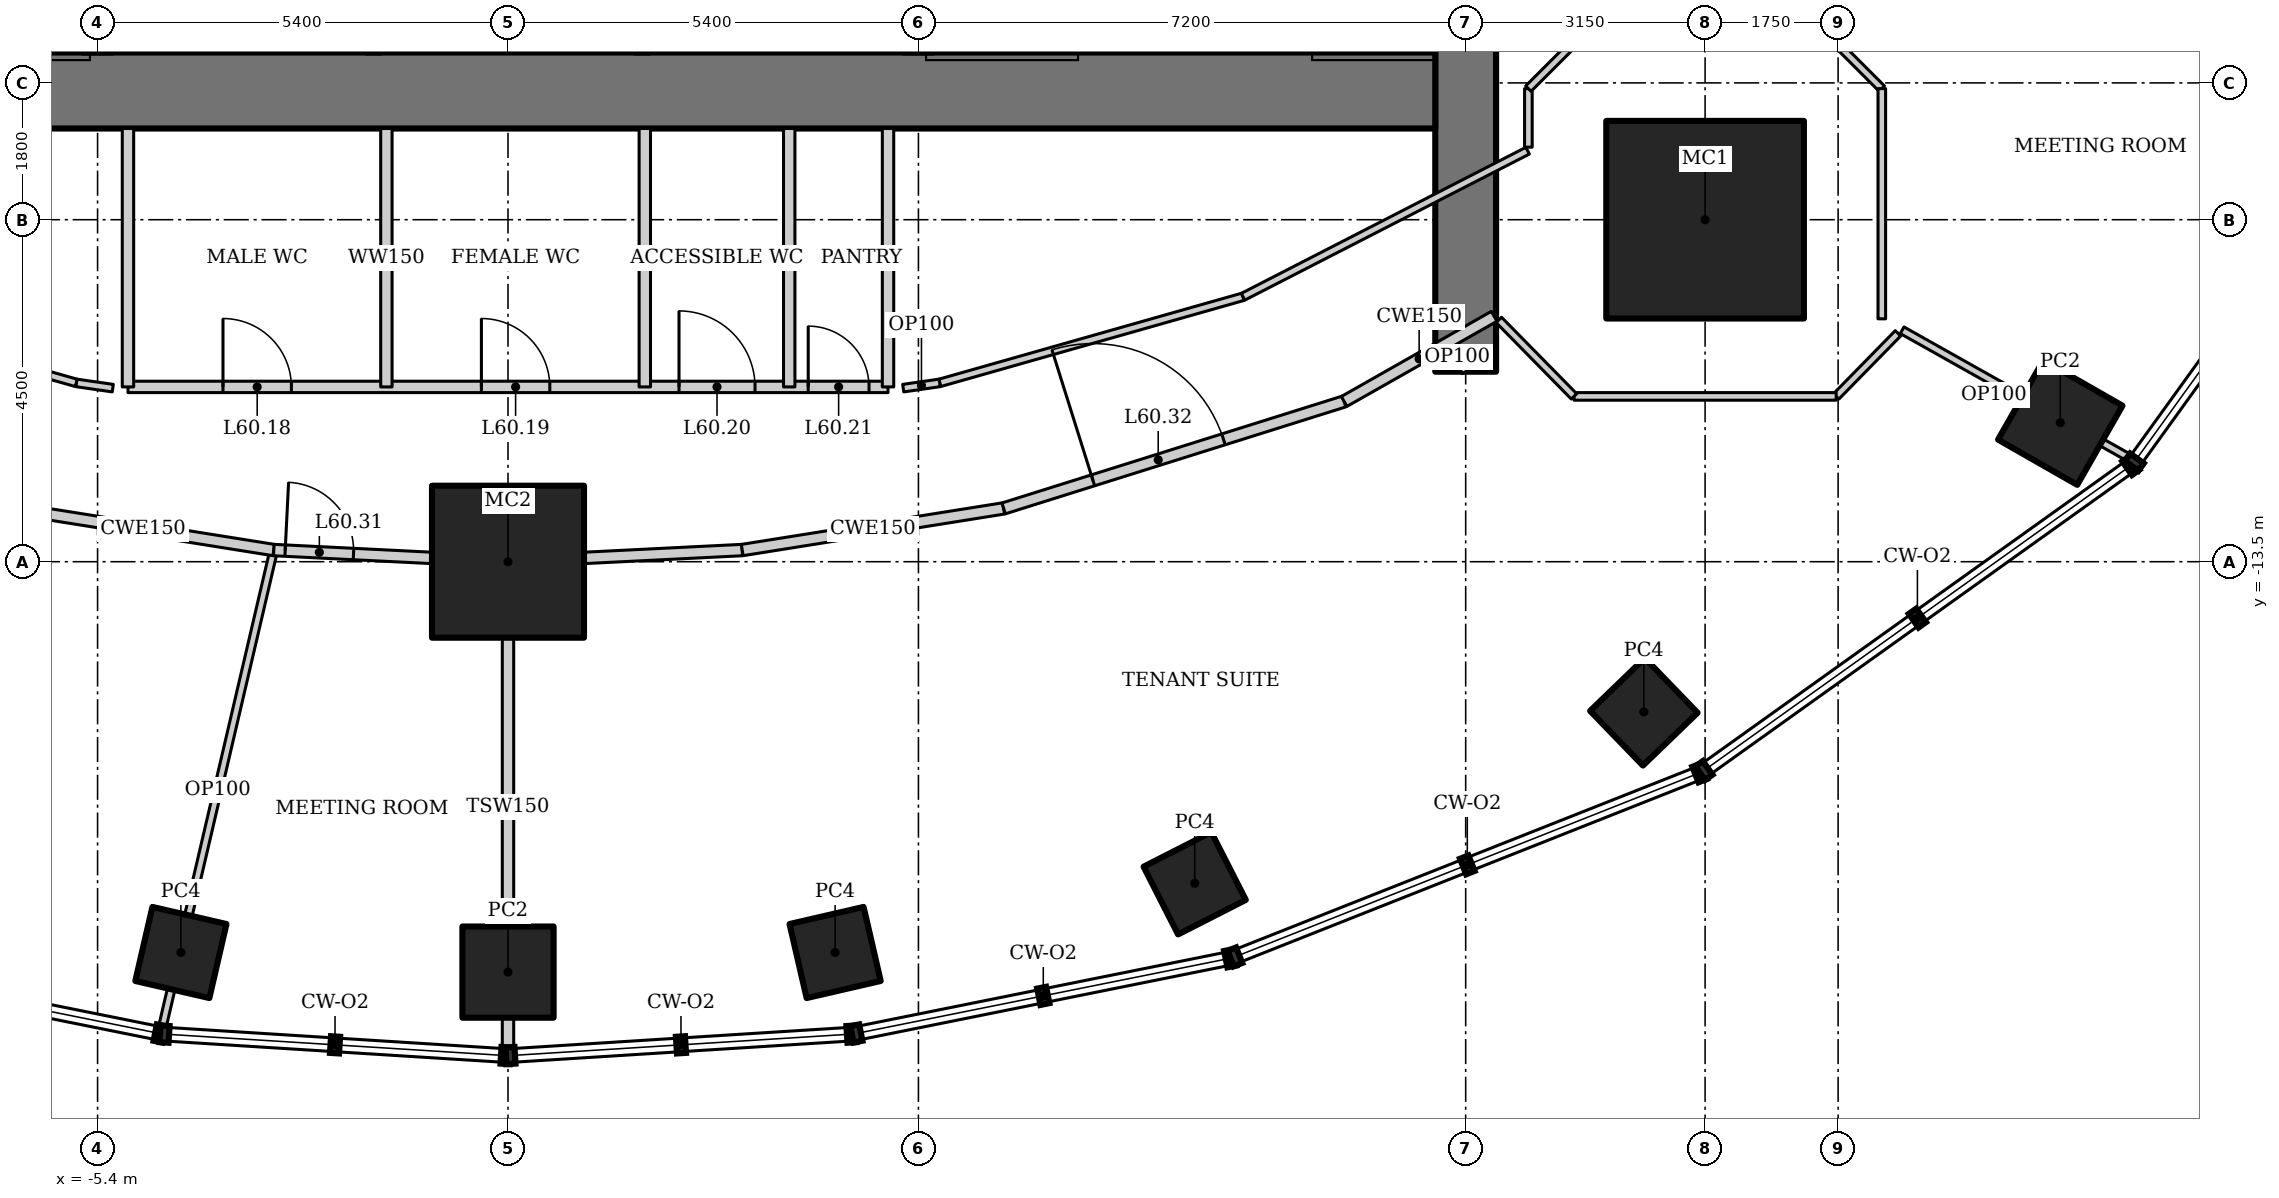
"""IFC4 building model, lengths in metres.
Left out: names, types, materials, properties, quantities, classifications, styles, units other than length and angle.
Written with IfcOpenShell. Run it as: python <this file> out.ifc"""

import sys

from ifc_helpers import new_model, si_unit, direction, frame, frame_2d, origin, origin_2d, place, context, subcontext, project, spatial, rectangle, hollow_rectangle, extrude, element, fill, save


model = new_model("IFC4")
c1 = context("Model", 3, precision=1e-05, world=origin(), true_north=direction((0.0, 1.0)))
c2 = subcontext(c1, "Body", "Model", "MODEL_VIEW")
j1 = project(units=[si_unit("LENGTHUNIT", "METRE"), si_unit("PLANEANGLEUNIT", "RADIAN")], contexts=[c1])
p1 = place(None, origin())
s1 = spatial("IfcSite", under=j1, at=p1, CompositionType="ELEMENT")
p2 = place(p1, origin())
s2 = spatial("IfcBuilding", under=s1, at=p2, CompositionType="ELEMENT")
p3 = place(p2, frame((0.0, 0.0, 257.8)))
s3 = spatial("IfcBuildingStorey", under=s2, at=p3, CompositionType="ELEMENT", Elevation=257.8)
p4 = place(p3, frame((0.0, -13.5, 0.0), z_axis=(0.0, 0.0, 1.0), x_axis=(1.0, 0.0, 0.0)))
e1 = element("IfcColumn", 1, at=p4, inside=s3, PredefinedType="COLUMN", context=c2, shape_type="SweptSolid", body=[
    extrude(hollow_rectangle(XDim=2.0, YDim=2.0, WallThickness=0.17, at=origin_2d()), origin(), (0.0, 0.0, 1.0), 4.2),
])
p5 = place(p3, frame((15.75, -9.0, 0.0), z_axis=(0.0, 0.0, 1.0), x_axis=(1.0, 0.0, 0.0)))
e2 = element("IfcColumn", 2, at=p5, inside=s3, PredefinedType="COLUMN", context=c2, shape_type="SweptSolid", body=[
    extrude(hollow_rectangle(XDim=2.6, YDim=2.6, WallThickness=0.13, at=origin_2d()), origin(), (0.0, 0.0, 1.0), 4.2),
])
p6 = place(p3, frame((-4.304, -18.642, 0.0), z_axis=(0.0, 0.0, 1.0), x_axis=(0.224951054344, 0.974370064785, 0.0)))
e3 = element("IfcColumn", 3, at=p6, inside=s3, PredefinedType="COLUMN", context=c2, shape_type="SweptSolid", body=[
    extrude(hollow_rectangle(XDim=1.0, YDim=1.0, WallThickness=0.08, at=origin_2d()), origin(), (0.0, 0.0, 1.0), 4.2),
])
p7 = place(p3, frame((0.0, -18.9, 0.0), z_axis=(0.0, 0.0, 1.0), x_axis=(1.0, 0.0, 0.0)))
e4 = element("IfcColumn", 4, at=p7, inside=s3, PredefinedType="COLUMN", context=c2, shape_type="SweptSolid", body=[
    extrude(hollow_rectangle(XDim=1.2, YDim=1.2, WallThickness=0.1, at=origin_2d()), origin(), (0.0, 0.0, 1.0), 4.2),
])
for number, where, z_axis, x_axis in (
    (5, (4.304, -18.642, 0.0), (0.0, 0.0, 1.0), (0.974, 0.225, 0.0)),
    (6, (9.035, -17.731, 0.0), (0.0, 0.0, 1.0), (0.891, 0.454, 0.0)),
    (7, (14.944, -15.475, 0.0), (0.0, 0.0, 1.0), (0.719, 0.695, 0.0)),
):
    element("IfcColumn", number, at=place(p3, frame(where, z_axis=z_axis, x_axis=x_axis)), inside=s3, PredefinedType="COLUMN", context=c2, shape_type="SweptSolid", body=[
        extrude(hollow_rectangle(XDim=1.0, YDim=1.0, WallThickness=0.08, at=origin_2d()), origin(), (0.0, 0.0, 1.0), 4.2),
    ])
p8 = place(p3, frame((20.423, -11.67, 0.0), z_axis=(0.0, 0.0, 1.0), x_axis=(0.496139221777, 0.86824298017, 0.0)))
e8 = element("IfcColumn", 8, at=p8, inside=s3, PredefinedType="COLUMN", context=c2, shape_type="SweptSolid", body=[
    extrude(hollow_rectangle(XDim=1.2, YDim=1.2, WallThickness=0.1, at=origin_2d()), origin(), (0.0, 0.0, 1.0), 4.2),
])
p9 = place(p3, frame((12.6, -11.0, 0.0), z_axis=(0.0, 0.0, 1.0), x_axis=(0.0, 1.0, 0.0)))
e9 = element("IfcWall", 9, at=p9, inside=s3, PredefinedType="SHEAR", context=c2, shape_type="SweptSolid", body=[
    extrude(rectangle(XDim=22.0, YDim=0.8, at=frame_2d((11.0, 0.0))), origin(), (0.0, 0.0, 1.0), 4.2),
])
p10 = place(p9, frame((10.1, 0.0, 0.0)))
e10 = element("IfcOpeningElement", 10, at=p10, cuts=e9, PredefinedType="OPENING", context=c2, shape_type="SweptSolid", body=[
    extrude(rectangle(XDim=1.8, YDim=2.1, at=frame_2d((0.9, 1.05))), frame((0.0, 0.41, 0.0), z_axis=(0.0, -1.0, 0.0), x_axis=(1.0, 0.0, 0.0)), (0.0, 0.0, 1.0), 0.82),
])
p11 = place(p3, frame((-12.2, -7.3, 0.0), z_axis=(0.0, 0.0, 1.0), x_axis=(1.0, 0.0, 0.0)))
e11 = element("IfcWall", 11, at=p11, inside=s3, PredefinedType="SHEAR", context=c2, shape_type="SweptSolid", body=[
    extrude(rectangle(XDim=24.4, YDim=1.0, at=frame_2d((12.2, 0.0))), origin(), (0.0, 0.0, 1.0), 4.2),
])
for number, where, z_axis, x_axis in (
    (12, (-1.767, -2.6, 0.0), (0.0, 0.0, 1.0), (0.0, -1.0, 0.0)),
    (13, (1.767, -2.6, 0.0), (0.0, 0.0, 1.0), (0.0, -1.0, 0.0)),
):
    element("IfcWall", number, at=place(p3, frame(where, z_axis=z_axis, x_axis=x_axis)), inside=s3, PredefinedType="SOLIDWALL", context=c2, shape_type="SweptSolid", body=[
        extrude(rectangle(XDim=4.2, YDim=0.2, at=frame_2d((2.1, 0.0))), origin(), (0.0, 0.0, 1.0), 4.2),
    ])
p12 = place(p3, frame((-4.556, -19.657, 0.0), z_axis=(0.0, 0.0, 1.0), x_axis=(0.227524978141, 0.973772244584, 0.0)))
e14 = element("IfcWall", 14, at=p12, inside=s3, PredefinedType="PARTITIONING", context=c2, shape_type="SweptSolid", body=[
    extrude(rectangle(XDim=6.48, YDim=0.1, at=frame_2d((3.24, 0.0))), origin(), (0.0, 0.0, 1.0), 3.293),
])
p13 = place(p3, frame((0.0, -19.945, 0.0), z_axis=(0.0, 0.0, 1.0), x_axis=(0.0, 1.0, 0.0)))
e15 = element("IfcWall", 15, at=p13, inside=s3, PredefinedType="PARTITIONING", context=c2, shape_type="SweptSolid", body=[
    extrude(rectangle(XDim=6.445, YDim=0.15, at=frame_2d((3.222, 0.0))), origin(), (0.0, 0.0, 1.0), 3.646),
])
p14 = place(p3, frame((-6.521, -12.799, 0.0), z_axis=(0.0, 0.0, 1.0), x_axis=(0.987554093087, -0.157279729233, 0.0)))
e16 = element("IfcWall", 16, at=p14, inside=s3, PredefinedType="PARTITIONING", context=c2, shape_type="SweptSolid", body=[
    extrude(rectangle(XDim=3.483, YDim=0.15, at=frame_2d((1.742, 0.0))), origin(), (0.0, 0.0, 1.0), 4.05),
])
p15 = place(p3, frame((-3.081, -13.347, 0.0), z_axis=(0.0, 0.0, 1.0), x_axis=(0.99876434787, -0.049696855278, 0.0)))
e17 = element("IfcWall", 17, at=p15, inside=s3, PredefinedType="PARTITIONING", context=c2, shape_type="SweptSolid", body=[
    extrude(rectangle(XDim=3.085, YDim=0.15, at=frame_2d((1.542, 0.0))), origin(), (0.0, 0.0, 1.0), 4.05),
])
p16 = place(p15, frame((0.15, 0.0, 0.0)))
e18 = element("IfcOpeningElement", 18, at=p16, cuts=e17, PredefinedType="OPENING", context=c2, shape_type="SweptSolid", body=[
    extrude(rectangle(XDim=0.9, YDim=2.1, at=frame_2d((0.45, 1.05))), frame((0.0, 0.085, 0.0), z_axis=(0.0, -1.0, 0.0), x_axis=(1.0, 0.0, 0.0)), (0.0, 0.0, 1.0), 0.17),
])
p17 = place(p3, frame((0.0, -13.5, 0.0), z_axis=(0.0, 0.0, 1.0), x_axis=(0.99876434787, 0.049696855278, 0.0)))
e19 = element("IfcWall", 19, at=p17, inside=s3, PredefinedType="PARTITIONING", context=c2, shape_type="SweptSolid", body=[
    extrude(rectangle(XDim=3.085, YDim=0.15, at=frame_2d((1.542, 0.0))), origin(), (0.0, 0.0, 1.0), 4.05),
])
p18 = place(p3, frame((3.081, -13.347, 0.0), z_axis=(0.0, 0.0, 1.0), x_axis=(0.987554093087, 0.157279729233, 0.0)))
e20 = element("IfcWall", 20, at=p18, inside=s3, PredefinedType="PARTITIONING", context=c2, shape_type="SweptSolid", body=[
    extrude(rectangle(XDim=3.483, YDim=0.15, at=frame_2d((1.742, 0.0))), origin(), (0.0, 0.0, 1.0), 4.05),
])
p19 = place(p3, frame((6.521, -12.799, 0.0), z_axis=(0.0, 0.0, 1.0), x_axis=(0.954031103669, 0.299707612903, 0.0)))
e21 = element("IfcWall", 21, at=p19, inside=s3, PredefinedType="PARTITIONING", context=c2, shape_type="SweptSolid", body=[
    extrude(rectangle(XDim=4.695, YDim=0.15, at=frame_2d((2.348, 0.0))), origin(), (0.0, 0.0, 1.0), 4.05),
])
p20 = place(p19, frame((1.231, 0.0, 0.0)))
e22 = element("IfcOpeningElement", 22, at=p20, cuts=e21, PredefinedType="OPENING", context=c2, shape_type="SweptSolid", body=[
    extrude(rectangle(XDim=1.8, YDim=2.1, at=frame_2d((0.9, 1.05))), frame((0.0, 0.085, 0.0), z_axis=(0.0, -1.0, 0.0), x_axis=(1.0, 0.0, 0.0)), (0.0, 0.0, 1.0), 0.17),
])
p21 = place(p3, frame((-5.0, -11.2, 0.0), z_axis=(0.0, 0.0, 1.0), x_axis=(1.0, 0.0, 0.0)))
e23 = element("IfcWall", 23, at=p21, inside=s3, PredefinedType="SOLIDWALL", context=c2, shape_type="SweptSolid", body=[
    extrude(rectangle(XDim=10.0, YDim=0.15, at=frame_2d((5.0, 0.0))), origin(), (0.0, 0.0, 1.0), 4.05),
])
p22 = place(p21, frame((1.25, 0.0, 0.0)))
e24 = element("IfcOpeningElement", 24, at=p22, cuts=e23, PredefinedType="OPENING", context=c2, shape_type="SweptSolid", body=[
    extrude(rectangle(XDim=0.9, YDim=2.1, at=frame_2d((0.45, 1.05))), frame((0.0, 0.085, 0.0), z_axis=(0.0, -1.0, 0.0), x_axis=(1.0, 0.0, 0.0)), (0.0, 0.0, 1.0), 0.17),
])
p23 = place(p21, frame((4.65, 0.0, 0.0)))
e25 = element("IfcOpeningElement", 25, at=p23, cuts=e23, PredefinedType="OPENING", context=c2, shape_type="SweptSolid", body=[
    extrude(rectangle(XDim=0.9, YDim=2.1, at=frame_2d((0.45, 1.05))), frame((0.0, 0.085, 0.0), z_axis=(0.0, -1.0, 0.0), x_axis=(1.0, 0.0, 0.0)), (0.0, 0.0, 1.0), 0.17),
])
p24 = place(p21, frame((7.25, 0.0, 0.0)))
e26 = element("IfcOpeningElement", 26, at=p24, cuts=e23, PredefinedType="OPENING", context=c2, shape_type="SweptSolid", body=[
    extrude(rectangle(XDim=1.0, YDim=2.1, at=frame_2d((0.5, 1.05))), frame((0.0, 0.085, 0.0), z_axis=(0.0, -1.0, 0.0), x_axis=(1.0, 0.0, 0.0)), (0.0, 0.0, 1.0), 0.17),
])
p25 = place(p21, frame((8.95, 0.0, 0.0)))
e27 = element("IfcOpeningElement", 27, at=p25, cuts=e23, PredefinedType="OPENING", context=c2, shape_type="SweptSolid", body=[
    extrude(rectangle(XDim=0.8, YDim=2.1, at=frame_2d((0.4, 1.05))), frame((0.0, 0.085, 0.0), z_axis=(0.0, -1.0, 0.0), x_axis=(1.0, 0.0, 0.0)), (0.0, 0.0, 1.0), 0.17),
])
for number, where, z_axis, x_axis in (
    (28, (-5.0, -7.8, 0.0), (0.0, 0.0, 1.0), (0.0, -1.0, 0.0)),
    (29, (5.0, -7.8, 0.0), (0.0, 0.0, 1.0), (0.0, -1.0, 0.0)),
    (30, (-1.6, -7.8, 0.0), (0.0, 0.0, 1.0), (0.0, -1.0, 0.0)),
):
    element("IfcWall", number, at=place(p3, frame(where, z_axis=z_axis, x_axis=x_axis)), inside=s3, PredefinedType="SOLIDWALL", context=c2, shape_type="SweptSolid", body=[
        extrude(rectangle(XDim=3.4, YDim=0.15, at=frame_2d((1.7, 0.0))), origin(), (0.0, 0.0, 1.0), 4.05),
    ])
p26 = place(p3, frame((1.8, -7.8, 0.0), z_axis=(0.0, 0.0, 1.0), x_axis=(0.0, -1.0, 0.0)))
e31 = element("IfcWall", 31, at=p26, inside=s3, PredefinedType="SOLIDWALL", context=c2, shape_type="SweptSolid", body=[
    extrude(rectangle(XDim=3.4, YDim=0.15, at=frame_2d((1.7, 0.0))), origin(), (0.0, 0.0, 1.0), 3.293),
])
p27 = place(p3, frame((3.7, -7.8, 0.0), z_axis=(0.0, 0.0, 1.0), x_axis=(0.0, -1.0, 0.0)))
e32 = element("IfcWall", 32, at=p27, inside=s3, PredefinedType="SOLIDWALL", context=c2, shape_type="SweptSolid", body=[
    extrude(rectangle(XDim=3.4, YDim=0.15, at=frame_2d((1.7, 0.0))), origin(), (0.0, 0.0, 1.0), 4.05),
])
p28 = place(p3, frame((-5.2, -11.216, 0.0), z_axis=(0.0, 0.0, 1.0), x_axis=(-0.989797891768, 0.142478536811, 0.0)))
e33 = element("IfcWall", 33, at=p28, inside=s3, PredefinedType="PARTITIONING", context=c2, shape_type="SweptSolid", body=[
    extrude(rectangle(XDim=0.485, YDim=0.1, at=frame_2d((0.242, 0.0))), origin(), (0.0, 0.0, 1.0), 4.05),
])
for number, where, z_axis, x_axis in (
    (34, (-5.68, -11.147, 0.0), (0.0, 0.0, 1.0), (-0.962, 0.273, 0.0)),
    (35, (9.67, -10.014, 0.0), (0.0, 0.0, 1.0), (-0.962, -0.273, 0.0)),
):
    element("IfcWall", number, at=place(p3, frame(where, z_axis=z_axis, x_axis=x_axis)), inside=s3, PredefinedType="PARTITIONING", context=c2, shape_type="SweptSolid", body=[
        extrude(rectangle(XDim=4.148, YDim=0.1, at=frame_2d((2.074, 0.0))), origin(), (0.0, 0.0, 1.0), 4.05),
    ])
p29 = place(p3, frame((5.68, -11.147, 0.0), z_axis=(0.0, 0.0, 1.0), x_axis=(-0.989797891768, -0.142478536811, 0.0)))
e36 = element("IfcWall", 36, at=p29, inside=s3, PredefinedType="PARTITIONING", context=c2, shape_type="SweptSolid", body=[
    extrude(rectangle(XDim=0.485, YDim=0.1, at=frame_2d((0.242, 0.0))), origin(), (0.0, 0.0, 1.0), 4.05),
])
p30 = place(p3, frame((12.6, -11.0, 0.0), z_axis=(0.0, 0.0, 1.0), x_axis=(-0.493794495037, 0.869578631678, 0.0)))
e37 = element("IfcWall", 37, at=p30, inside=s3, PredefinedType="PARTITIONING", context=c2, shape_type="SweptSolid", body=[
    extrude(rectangle(XDim=0.449, YDim=0.1, at=frame_2d((0.225, 0.0))), origin(), (0.0, 0.0, 1.0), 4.05),
])
p31 = place(p3, frame((21.358, -12.15, 0.0), z_axis=(0.0, 0.0, 1.0), x_axis=(-0.871730019583, 0.489986502832, 0.0)))
e38 = element("IfcWall", 38, at=p31, inside=s3, PredefinedType="PARTITIONING", context=c2, shape_type="SweptSolid", body=[
    extrude(rectangle(XDim=3.46, YDim=0.1, at=frame_2d((1.73, 0.0))), origin(), (0.0, 0.0, 1.0), 3.522),
])
p32 = place(p3, frame((11.001, -11.392, 0.0), z_axis=(0.0, 0.0, 1.0), x_axis=(0.869722107117, 0.493541747366, 0.0)))
e39 = element("IfcWall", 39, at=p32, inside=s3, PredefinedType="PARTITIONING", context=c2, shape_type="SweptSolid", body=[
    extrude(rectangle(XDim=2.27, YDim=0.15, at=frame_2d((1.135, 0.0))), origin(), (0.0, 0.0, 1.0), 4.05),
])
p33 = place(p3, frame((13.415, -8.092, 0.0), z_axis=(0.0, 0.0, 1.0), x_axis=(-0.889620520549, -0.45670048108, 0.0)))
e40 = element("IfcWall", 40, at=p33, inside=s3, PredefinedType="PARTITIONING", context=c2, shape_type="SweptSolid", body=[
    extrude(rectangle(XDim=4.209, YDim=0.1, at=frame_2d((2.104, 0.0))), origin(), (0.0, 0.0, 1.0), 4.05),
])
p34 = place(p3, frame((13.425, -8.046, 0.0), z_axis=(0.0, 0.0, 1.0), x_axis=(0.0, 1.0, 0.0)))
e41 = element("IfcWall", 41, at=p34, inside=s3, PredefinedType="PARTITIONING", context=c2, shape_type="SweptSolid", body=[
    extrude(rectangle(XDim=0.77, YDim=0.1, at=frame_2d((0.385, 0.0))), origin(), (0.0, 0.0, 1.0), 4.05),
])
p35 = place(p3, frame((13.425, -7.275, 0.0), z_axis=(0.0, 0.0, 1.0), x_axis=(0.707106781187, 0.707106781187, 0.0)))
e42 = element("IfcWall", 42, at=p35, inside=s3, PredefinedType="PARTITIONING", context=c2, shape_type="SweptSolid", body=[
    extrude(rectangle(XDim=0.849, YDim=0.1, at=frame_2d((0.425, 0.0))), origin(), (0.0, 0.0, 1.0), 4.05),
])
p36 = place(p3, frame((18.288, -10.495, 0.0), z_axis=(0.0, 0.0, 1.0), x_axis=(-0.699823580681, -0.714315725659, 0.0)))
e43 = element("IfcWall", 43, at=p36, inside=s3, PredefinedType="PARTITIONING", context=c2, shape_type="SweptSolid", body=[
    extrude(rectangle(XDim=1.162, YDim=0.1, at=frame_2d((0.581, 0.0))), origin(), (0.0, 0.0, 1.0), 4.05),
])
p37 = place(p3, frame((17.475, -11.325, 0.0), z_axis=(0.0, 0.0, 1.0), x_axis=(-1.0, 0.0, 0.0)))
e44 = element("IfcWall", 44, at=p37, inside=s3, PredefinedType="PARTITIONING", context=c2, shape_type="SweptSolid", body=[
    extrude(rectangle(XDim=3.449, YDim=0.1, at=frame_2d((1.725, 0.0))), origin(), (0.0, 0.0, 1.0), 4.05),
])
p38 = place(p3, frame((14.025, -11.325, 0.0), z_axis=(0.0, 0.0, 1.0), x_axis=(-0.701113567316, 0.713049623606, 0.0)))
e45 = element("IfcWall", 45, at=p38, inside=s3, PredefinedType="PARTITIONING", context=c2, shape_type="SweptSolid", body=[
    extrude(rectangle(XDim=1.411, YDim=0.1, at=frame_2d((0.706, 0.0))), origin(), (0.0, 0.0, 1.0), 4.05),
])
p39 = place(p3, frame((17.538, -6.738, 0.0), z_axis=(0.0, 0.0, 1.0), x_axis=(0.707106781187, -0.707106781187, 0.0)))
e46 = element("IfcWall", 46, at=p39, inside=s3, PredefinedType="PARTITIONING", context=c2, shape_type="SweptSolid", body=[
    extrude(rectangle(XDim=0.76, YDim=0.1, at=frame_2d((0.38, 0.0))), origin(), (0.0, 0.0, 1.0), 4.05),
])
p40 = place(p3, frame((18.075, -7.275, 0.0), z_axis=(0.0, 0.0, 1.0), x_axis=(0.0, -1.0, 0.0)))
e47 = element("IfcWall", 47, at=p40, inside=s3, PredefinedType="PARTITIONING", context=c2, shape_type="SweptSolid", body=[
    extrude(rectangle(XDim=3.029, YDim=0.1, at=frame_2d((1.514, 0.0))), origin(), (0.0, 0.0, 1.0), 3.6),
])
p41 = place(p22, origin())
e48 = element("IfcDoor", 48, at=p41, inside=s3, OperationType="SINGLE_SWING_LEFT", PredefinedType="DOOR", context=c2, shape_type="SweptSolid", body=[
    extrude(rectangle(XDim=0.9, YDim=2.1, at=frame_2d((0.45, 1.05))), frame((0.0, 0.025, 0.0), z_axis=(0.0, -1.0, 0.0), x_axis=(1.0, 0.0, 0.0)), (0.0, 0.0, 1.0), 0.05),
])
fill(e24, e48)
p42 = place(p23, origin())
e49 = element("IfcDoor", 49, at=p42, inside=s3, OperationType="SINGLE_SWING_LEFT", PredefinedType="DOOR", context=c2, shape_type="SweptSolid", body=[
    extrude(rectangle(XDim=0.9, YDim=2.1, at=frame_2d((0.45, 1.05))), frame((0.0, 0.025, 0.0), z_axis=(0.0, -1.0, 0.0), x_axis=(1.0, 0.0, 0.0)), (0.0, 0.0, 1.0), 0.05),
])
fill(e25, e49)
p43 = place(p24, origin())
e50 = element("IfcDoor", 50, at=p43, inside=s3, OperationType="SINGLE_SWING_LEFT", PredefinedType="DOOR", context=c2, shape_type="SweptSolid", body=[
    extrude(rectangle(XDim=1.0, YDim=2.1, at=frame_2d((0.5, 1.05))), frame((0.0, 0.025, 0.0), z_axis=(0.0, -1.0, 0.0), x_axis=(1.0, 0.0, 0.0)), (0.0, 0.0, 1.0), 0.05),
])
fill(e26, e50)
p44 = place(p25, origin())
e51 = element("IfcDoor", 51, at=p44, inside=s3, OperationType="SINGLE_SWING_LEFT", PredefinedType="DOOR", context=c2, shape_type="SweptSolid", body=[
    extrude(rectangle(XDim=0.8, YDim=2.1, at=frame_2d((0.4, 1.05))), frame((0.0, 0.025, 0.0), z_axis=(0.0, -1.0, 0.0), x_axis=(1.0, 0.0, 0.0)), (0.0, 0.0, 1.0), 0.05),
])
fill(e27, e51)
p45 = place(p16, origin())
e52 = element("IfcDoor", 52, at=p45, inside=s3, OperationType="SINGLE_SWING_LEFT", PredefinedType="DOOR", context=c2, shape_type="SweptSolid", body=[
    extrude(rectangle(XDim=0.9, YDim=2.1, at=frame_2d((0.45, 1.05))), frame((0.0, 0.025, 0.0), z_axis=(0.0, -1.0, 0.0), x_axis=(1.0, 0.0, 0.0)), (0.0, 0.0, 1.0), 0.05),
])
fill(e18, e52)
p46 = place(p20, origin())
e53 = element("IfcDoor", 53, at=p46, inside=s3, OperationType="DOUBLE_DOOR_DOUBLE_SWING", PredefinedType="DOOR", context=c2, shape_type="SweptSolid", body=[
    extrude(rectangle(XDim=1.8, YDim=2.1, at=frame_2d((0.9, 1.05))), frame((0.0, 0.025, 0.0), z_axis=(0.0, -1.0, 0.0), x_axis=(1.0, 0.0, 0.0)), (0.0, 0.0, 1.0), 0.05),
])
fill(e22, e53)
save(model, sys.argv[1])
